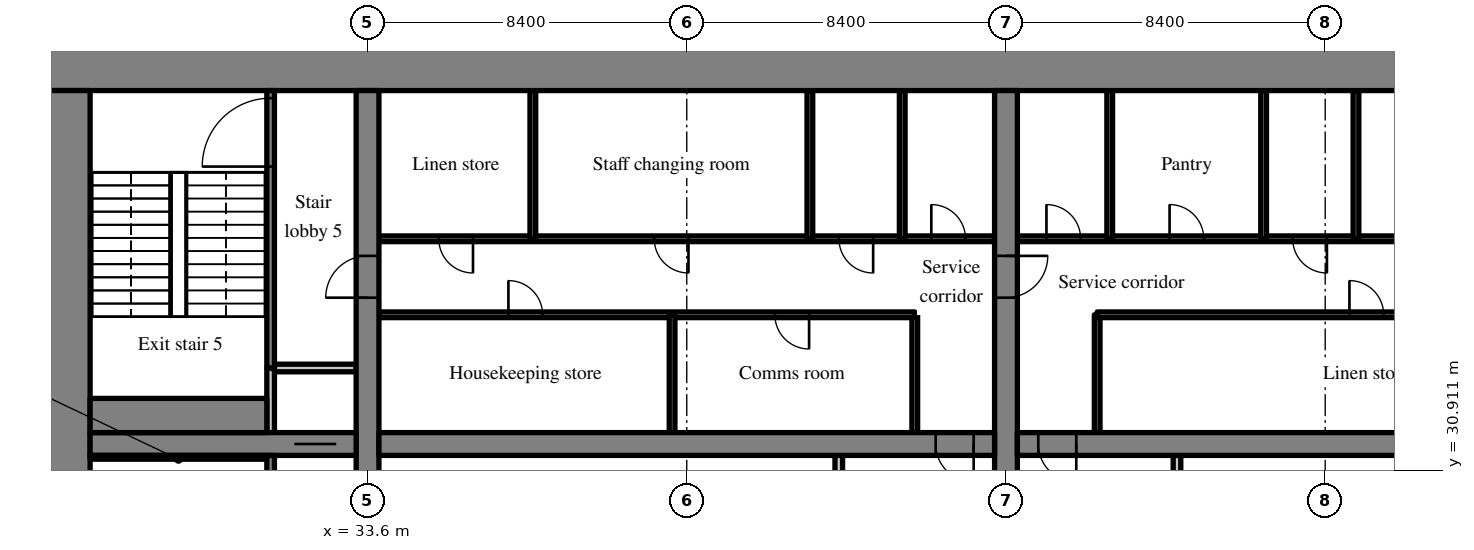
"""IFC4 building model, lengths in metres.
Left out: names, types, materials, properties, quantities, classifications, styles, units other than length and angle.
Written with IfcOpenShell. Run it as: python <this file> out.ifc"""

import sys

from ifc_helpers import new_model, si_unit, direction, frame, frame_2d, origin, place, context, subcontext, project, spatial, rectangle, extrude, source, transform, mapped, element, fill, save


model = new_model("IFC4")
c1 = context("Model", 3, precision=1e-05, world=origin(), true_north=direction((0.0, 1.0)))
c2 = subcontext(c1, "Body", "Model", "MODEL_VIEW")
j1 = project(units=[si_unit("LENGTHUNIT", "METRE"), si_unit("PLANEANGLEUNIT", "RADIAN")], contexts=[c1])
p1 = place(None, origin())
s1 = spatial("IfcSite", under=j1, at=p1, CompositionType="ELEMENT")
p2 = place(p1, origin())
s2 = spatial("IfcBuilding", under=s1, at=p2, CompositionType="ELEMENT")
p3 = place(p2, frame((0.0, 0.0, 23.0)))
s3 = spatial("IfcBuildingStorey", under=s2, at=p3, CompositionType="ELEMENT", Elevation=23.0)
m1 = source(origin(), c2, "Body", "SweptSolid", [
    extrude(rectangle(XDim=50.4, YDim=1.1, at=frame_2d((25.2, 0.0))), origin(), (0.0, 0.0, 1.0), 4.52),
])
p4 = place(p3, frame((25.2, 41.45, 0.0), z_axis=(0.0, 0.0, 1.0), x_axis=(1.0, 0.0, 0.0)))
e1 = element("IfcWall", 1, at=p4, inside=s3, PredefinedType="SHEAR", context=c2, shape_type="MappedRepresentation", body=[
    mapped(m1, transform((0.0, 0.0, 0.0), scale=1.0)),
])
m2 = source(origin(), c2, "Body", "SweptSolid", [
    extrude(rectangle(XDim=17.8, YDim=1.1, at=frame_2d((8.9, 0.0))), origin(), (0.0, 0.0, 1.0), 4.52),
])
p5 = place(p3, frame((25.75, 23.1, 0.0), z_axis=(0.0, 0.0, 1.0), x_axis=(0.0, 1.0, 0.0)))
e2 = element("IfcWall", 2, at=p5, inside=s3, PredefinedType="SHEAR", context=c2, shape_type="MappedRepresentation", body=[
    mapped(m2, transform((0.0, 0.0, 0.0), scale=1.0)),
])
m3 = source(origin(), c2, "Body", "SweptSolid", [
    extrude(rectangle(XDim=17.8, YDim=0.6, at=frame_2d((8.9, 0.0))), origin(), (0.0, 0.0, 1.0), 4.52),
])
p6 = place(p3, frame((33.6, 23.1, 0.0), z_axis=(0.0, 0.0, 1.0), x_axis=(0.0, 1.0, 0.0)))
e3 = element("IfcWall", 3, at=p6, inside=s3, PredefinedType="SHEAR", context=c2, shape_type="MappedRepresentation", body=[
    mapped(m3, transform((0.0, 0.0, 0.0), scale=1.0)),
])
m4 = source(origin(), c2, "Body", "SweptSolid", [
    extrude(rectangle(XDim=1.1, YDim=2.1, at=frame_2d((0.55, 1.05))), frame((0.0, 0.31, 0.0), z_axis=(0.0, -1.0, 0.0), x_axis=(1.0, 0.0, 0.0)), (0.0, 0.0, 1.0), 0.62),
])
p7 = place(p6, frame((12.35, 0.0, 0.0)))
e4 = element("IfcOpeningElement", 4, at=p7, cuts=e3, PredefinedType="OPENING", context=c2, shape_type="MappedRepresentation", body=[
    mapped(m4, transform((0.0, 0.0, 0.0), scale=1.0)),
])
p8 = place(p3, frame((50.4, 23.1, 0.0), z_axis=(0.0, 0.0, 1.0), x_axis=(0.0, 1.0, 0.0)))
e5 = element("IfcWall", 5, at=p8, inside=s3, PredefinedType="SHEAR", context=c2, shape_type="MappedRepresentation", body=[
    mapped(m3, transform((0.0, 0.0, 0.0), scale=1.0)),
])
p9 = place(p8, frame((12.35, 0.0, 0.0)))
e6 = element("IfcOpeningElement", 6, at=p9, cuts=e5, PredefinedType="OPENING", context=c2, shape_type="MappedRepresentation", body=[
    mapped(m4, transform((0.0, 0.0, 0.0), scale=1.0)),
])
m5 = source(origin(), c2, "Body", "SweptSolid", [
    extrude(rectangle(XDim=7.0, YDim=0.6, at=frame_2d((3.5, 0.0))), origin(), (0.0, 0.0, 1.0), 4.52),
])
p10 = place(p3, frame((26.3, 31.6, 0.0), z_axis=(0.0, 0.0, 1.0), x_axis=(1.0, 0.0, 0.0)))
e7 = element("IfcWall", 7, at=p10, inside=s3, PredefinedType="SHEAR", context=c2, shape_type="MappedRepresentation", body=[
    mapped(m5, transform((0.0, 0.0, 0.0), scale=1.0)),
])
p11 = place(p10, frame((5.375, 0.0, 0.0)))
e8 = element("IfcOpeningElement", 8, at=p11, cuts=e7, PredefinedType="OPENING", context=c2, shape_type="MappedRepresentation", body=[
    mapped(m4, transform((0.0, 0.0, 0.0), scale=1.0)),
])
m6 = source(origin(), c2, "Body", "SweptSolid", [
    extrude(rectangle(XDim=16.2, YDim=0.6, at=frame_2d((8.1, 0.0))), origin(), (0.0, 0.0, 1.0), 4.52),
])
p12 = place(p3, frame((33.9, 31.6, 0.0), z_axis=(0.0, 0.0, 1.0), x_axis=(1.0, 0.0, 0.0)))
e9 = element("IfcWall", 9, at=p12, inside=s3, PredefinedType="SHEAR", context=c2, shape_type="MappedRepresentation", body=[
    mapped(m6, transform((0.0, 0.0, 0.0), scale=1.0)),
])
m7 = source(origin(), c2, "Body", "SweptSolid", [
    extrude(rectangle(XDim=1.0, YDim=2.1, at=frame_2d((0.5, 1.05))), frame((0.0, 0.31, 0.0), z_axis=(0.0, -1.0, 0.0), x_axis=(1.0, 0.0, 0.0)), (0.0, 0.0, 1.0), 0.62),
])
p13 = place(p12, frame((14.65, 0.0, 0.0)))
e10 = element("IfcOpeningElement", 10, at=p13, cuts=e9, PredefinedType="OPENING", context=c2, shape_type="MappedRepresentation", body=[
    mapped(m7, transform((0.0, 0.0, 0.0), scale=1.0)),
])
m8 = source(origin(), c2, "Body", "SweptSolid", [
    extrude(rectangle(XDim=16.2, YDim=0.6, at=frame_2d((8.1, 0.0))), origin(), (0.0, 0.0, 1.0), 4.52),
])
p14 = place(p3, frame((50.7, 31.6, 0.0), z_axis=(0.0, 0.0, 1.0), x_axis=(1.0, 0.0, 0.0)))
e11 = element("IfcWall", 11, at=p14, inside=s3, PredefinedType="SHEAR", context=c2, shape_type="MappedRepresentation", body=[
    mapped(m8, transform((0.0, 0.0, 0.0), scale=1.0)),
])
p15 = place(p14, frame((0.55, 0.0, 0.0)))
e12 = element("IfcOpeningElement", 12, at=p15, cuts=e11, PredefinedType="OPENING", context=c2, shape_type="MappedRepresentation", body=[
    mapped(m7, transform((0.0, 0.0, 0.0), scale=1.0)),
])
m9 = source(origin(), c2, "Body", "SweptSolid", [
    extrude(rectangle(XDim=2.5, YDim=0.2, at=frame_2d((1.25, 0.0))), origin(), (0.0, 0.0, 1.0), 4.52),
])
p16 = place(p3, frame((46.0, 28.8, 0.0), z_axis=(0.0, 0.0, 1.0), x_axis=(0.0, 1.0, 0.0)))
e13 = element("IfcWall", 13, at=p16, inside=s3, PredefinedType="SOLIDWALL", context=c2, shape_type="MappedRepresentation", body=[
    mapped(m9, transform((0.0, 0.0, 0.0), scale=1.0)),
])
m10 = source(origin(), c2, "Body", "SweptSolid", [
    extrude(rectangle(XDim=3.1, YDim=0.15, at=frame_2d((1.55, 0.0))), origin(), (0.0, 0.0, 1.0), 4.52),
])
p17 = place(p3, frame((48.0, 31.9, 0.0), z_axis=(0.0, 0.0, 1.0), x_axis=(0.0, 1.0, 0.0)))
e14 = element("IfcWall", 14, at=p17, inside=s3, PredefinedType="PARTITIONING", context=c2, shape_type="MappedRepresentation", body=[
    mapped(m10, transform((0.0, 0.0, 0.0), scale=1.0)),
])
m11 = source(origin(), c2, "Body", "SweptSolid", [
    extrude(rectangle(XDim=14.1, YDim=0.15, at=frame_2d((7.05, 0.0))), origin(), (0.0, 0.0, 1.0), 4.52),
])
p18 = place(p3, frame((33.9, 35.0, 0.0), z_axis=(0.0, 0.0, 1.0), x_axis=(1.0, 0.0, 0.0)))
e15 = element("IfcWall", 15, at=p18, inside=s3, PredefinedType="PARTITIONING", context=c2, shape_type="MappedRepresentation", body=[
    mapped(m11, transform((0.0, 0.0, 0.0), scale=1.0)),
])
m12 = source(origin(), c2, "Body", "SweptSolid", [
    extrude(rectangle(XDim=0.9, YDim=2.1, at=frame_2d((0.45, 1.05))), frame((0.0, 0.085, 0.0), z_axis=(0.0, -1.0, 0.0), x_axis=(1.0, 0.0, 0.0)), (0.0, 0.0, 1.0), 0.17),
])
p19 = place(p18, frame((3.407, 0.0, 0.0)))
e16 = element("IfcOpeningElement", 16, at=p19, cuts=e15, PredefinedType="OPENING", context=c2, shape_type="MappedRepresentation", body=[
    mapped(m12, transform((0.0, 0.0, 0.0), scale=1.0)),
])
p20 = place(p18, frame((10.419, 0.0, 0.0)))
e17 = element("IfcOpeningElement", 17, at=p20, cuts=e15, PredefinedType="OPENING", context=c2, shape_type="MappedRepresentation", body=[
    mapped(m12, transform((0.0, 0.0, 0.0), scale=1.0)),
])
m13 = source(origin(), c2, "Body", "SweptSolid", [
    extrude(rectangle(XDim=16.2, YDim=0.15, at=frame_2d((8.1, 0.0))), origin(), (0.0, 0.0, 1.0), 4.52),
])
p21 = place(p3, frame((33.9, 37.0, 0.0), z_axis=(0.0, 0.0, 1.0), x_axis=(1.0, 0.0, 0.0)))
e18 = element("IfcWall", 18, at=p21, inside=s3, PredefinedType="PARTITIONING", context=c2, shape_type="MappedRepresentation", body=[
    mapped(m13, transform((0.0, 0.0, 0.0), scale=1.0)),
])
p22 = place(p21, frame((1.575, 0.0, 0.0)))
e19 = element("IfcOpeningElement", 19, at=p22, cuts=e18, PredefinedType="OPENING", context=c2, shape_type="MappedRepresentation", body=[
    mapped(m12, transform((0.0, 0.0, 0.0), scale=1.0)),
])
p23 = place(p21, frame((7.245, 0.0, 0.0)))
e20 = element("IfcOpeningElement", 20, at=p23, cuts=e18, PredefinedType="OPENING", context=c2, shape_type="MappedRepresentation", body=[
    mapped(m12, transform((0.0, 0.0, 0.0), scale=1.0)),
])
p24 = place(p21, frame((12.105, 0.0, 0.0)))
e21 = element("IfcOpeningElement", 21, at=p24, cuts=e18, PredefinedType="OPENING", context=c2, shape_type="MappedRepresentation", body=[
    mapped(m12, transform((0.0, 0.0, 0.0), scale=1.0)),
])
p25 = place(p21, frame((14.535, 0.0, 0.0)))
e22 = element("IfcOpeningElement", 22, at=p25, cuts=e18, PredefinedType="OPENING", context=c2, shape_type="MappedRepresentation", body=[
    mapped(m12, transform((0.0, 0.0, 0.0), scale=1.0)),
])
p26 = place(p3, frame((41.614, 31.9, 0.0), z_axis=(0.0, 0.0, 1.0), x_axis=(0.0, 1.0, 0.0)))
e23 = element("IfcWall", 23, at=p26, inside=s3, PredefinedType="PARTITIONING", context=c2, shape_type="MappedRepresentation", body=[
    mapped(m10, transform((0.0, 0.0, 0.0), scale=1.0)),
])
m14 = source(origin(), c2, "Body", "SweptSolid", [
    extrude(rectangle(XDim=3.9, YDim=0.15, at=frame_2d((1.95, 0.0))), origin(), (0.0, 0.0, 1.0), 4.52),
])
for number, where, z_axis, x_axis in (
    (24, (37.95, 37.0, 0.0), (0.0, 0.0, 1.0), (0.0, 1.0, 0.0)),
    (25, (45.24, 37.0, 0.0), (0.0, 0.0, 1.0), (0.0, 1.0, 0.0)),
    (26, (47.67, 37.0, 0.0), (0.0, 0.0, 1.0), (0.0, 1.0, 0.0)),
):
    element("IfcWall", number, at=place(p3, frame(where, z_axis=z_axis, x_axis=x_axis)), inside=s3, PredefinedType="PARTITIONING", context=c2, shape_type="MappedRepresentation", body=[
        mapped(m14, transform((0.0, 0.0, 0.0), scale=1.0)),
    ])
m15 = source(origin(), c2, "Body", "SweptSolid", [
    extrude(rectangle(XDim=8.2, YDim=0.2, at=frame_2d((4.1, 0.0))), origin(), (0.0, 0.0, 1.0), 4.52),
])
p27 = place(p3, frame((54.9, 23.1, 0.0), z_axis=(0.0, 0.0, 1.0), x_axis=(0.0, 1.0, 0.0)))
e27 = element("IfcWall", 27, at=p27, inside=s3, PredefinedType="PARTITIONING", context=c2, shape_type="MappedRepresentation", body=[
    mapped(m15, transform((0.0, 0.0, 0.0), scale=1.0)),
])
p28 = place(p3, frame((52.8, 31.9, 0.0), z_axis=(0.0, 0.0, 1.0), x_axis=(0.0, 1.0, 0.0)))
e28 = element("IfcWall", 28, at=p28, inside=s3, PredefinedType="PARTITIONING", context=c2, shape_type="MappedRepresentation", body=[
    mapped(m10, transform((0.0, 0.0, 0.0), scale=1.0)),
])
m16 = source(origin(), c2, "Body", "SweptSolid", [
    extrude(rectangle(XDim=14.1, YDim=0.15, at=frame_2d((7.05, 0.0))), origin(), (0.0, 0.0, 1.0), 4.52),
])
p29 = place(p3, frame((66.9, 35.0, 0.0), z_axis=(0.0, 0.0, 1.0), x_axis=(-1.0, 0.0, 0.0)))
e29 = element("IfcWall", 29, at=p29, inside=s3, PredefinedType="PARTITIONING", context=c2, shape_type="MappedRepresentation", body=[
    mapped(m16, transform((0.0, 0.0, 0.0), scale=1.0)),
])
p30 = place(p29, frame((6.562, 0.0, 0.0)))
e30 = element("IfcOpeningElement", 30, at=p30, cuts=e29, PredefinedType="OPENING", context=c2, shape_type="MappedRepresentation", body=[
    mapped(m12, transform((0.0, 0.0, 0.0), scale=1.0)),
])
m17 = source(origin(), c2, "Body", "SweptSolid", [
    extrude(rectangle(XDim=16.2, YDim=0.15, at=frame_2d((8.1, 0.0))), origin(), (0.0, 0.0, 1.0), 4.52),
])
p31 = place(p3, frame((66.9, 37.0, 0.0), z_axis=(0.0, 0.0, 1.0), x_axis=(-1.0, 0.0, 0.0)))
e31 = element("IfcWall", 31, at=p31, inside=s3, PredefinedType="PARTITIONING", context=c2, shape_type="MappedRepresentation", body=[
    mapped(m17, transform((0.0, 0.0, 0.0), scale=1.0)),
])
p32 = place(p31, frame((3.195, 0.0, 0.0)))
e32 = element("IfcOpeningElement", 32, at=p32, cuts=e31, PredefinedType="OPENING", context=c2, shape_type="MappedRepresentation", body=[
    mapped(m12, transform((0.0, 0.0, 0.0), scale=1.0)),
])
p33 = place(p31, frame((8.055, 0.0, 0.0)))
e33 = element("IfcOpeningElement", 33, at=p33, cuts=e31, PredefinedType="OPENING", context=c2, shape_type="MappedRepresentation", body=[
    mapped(m12, transform((0.0, 0.0, 0.0), scale=1.0)),
])
p34 = place(p31, frame((11.295, 0.0, 0.0)))
e34 = element("IfcOpeningElement", 34, at=p34, cuts=e31, PredefinedType="OPENING", context=c2, shape_type="MappedRepresentation", body=[
    mapped(m12, transform((0.0, 0.0, 0.0), scale=1.0)),
])
p35 = place(p31, frame((14.535, 0.0, 0.0)))
e35 = element("IfcOpeningElement", 35, at=p35, cuts=e31, PredefinedType="OPENING", context=c2, shape_type="MappedRepresentation", body=[
    mapped(m12, transform((0.0, 0.0, 0.0), scale=1.0)),
])
for number, where, z_axis, x_axis in (
    (36, (59.61, 37.0, 0.0), (0.0, 0.0, 1.0), (0.0, 1.0, 0.0)),
    (37, (57.18, 37.0, 0.0), (0.0, 0.0, 1.0), (0.0, 1.0, 0.0)),
    (38, (53.13, 37.0, 0.0), (0.0, 0.0, 1.0), (0.0, 1.0, 0.0)),
):
    element("IfcWall", number, at=place(p3, frame(where, z_axis=z_axis, x_axis=x_axis)), inside=s3, PredefinedType="PARTITIONING", context=c2, shape_type="MappedRepresentation", body=[
        mapped(m14, transform((0.0, 0.0, 0.0), scale=1.0)),
    ])
m18 = source(origin(), c2, "Body", "SweptSolid", [
    extrude(rectangle(XDim=8.2, YDim=0.2, at=frame_2d((4.1, 0.0))), origin(), (0.0, 0.0, 1.0), 4.52),
])
p36 = place(p3, frame((31.05, 23.1, 0.0), z_axis=(0.0, 0.0, 1.0), x_axis=(0.0, 1.0, 0.0)))
e39 = element("IfcWall", 39, at=p36, inside=s3, PredefinedType="SOLIDWALL", context=c2, shape_type="MappedRepresentation", body=[
    mapped(m18, transform((0.0, 0.0, 0.0), scale=1.0)),
])
m19 = source(origin(), c2, "Body", "SweptSolid", [
    extrude(rectangle(XDim=1.2, YDim=2.1, at=frame_2d((0.6, 1.05))), frame((0.0, 0.11, 0.0), z_axis=(0.0, -1.0, 0.0), x_axis=(1.0, 0.0, 0.0)), (0.0, 0.0, 1.0), 0.22),
])
p37 = place(p36, frame((6.4, 0.0, 0.0)))
e40 = element("IfcOpeningElement", 40, at=p37, cuts=e39, PredefinedType="OPENING", context=c2, shape_type="MappedRepresentation", body=[
    mapped(m19, transform((0.0, 0.0, 0.0), scale=1.0)),
])
m20 = source(origin(), c2, "Body", "SweptSolid", [
    extrude(rectangle(XDim=1.7, YDim=0.2, at=frame_2d((0.85, 0.0))), origin(), (0.0, 0.0, 1.0), 4.52),
])
p38 = place(p3, frame((31.05, 31.9, 0.0), z_axis=(0.0, 0.0, 1.0), x_axis=(0.0, 1.0, 0.0)))
e41 = element("IfcWall", 41, at=p38, inside=s3, PredefinedType="SOLIDWALL", context=c2, shape_type="MappedRepresentation", body=[
    mapped(m20, transform((0.0, 0.0, 0.0), scale=1.0)),
])
m21 = source(origin(), c2, "Body", "SweptSolid", [
    extrude(rectangle(XDim=2.15, YDim=0.2, at=frame_2d((1.075, 0.0))), origin(), (0.0, 0.0, 1.0), 4.52),
])
p39 = place(p3, frame((31.15, 33.6, 0.0), z_axis=(0.0, 0.0, 1.0), x_axis=(1.0, 0.0, 0.0)))
e42 = element("IfcWall", 42, at=p39, inside=s3, PredefinedType="SOLIDWALL", context=c2, shape_type="MappedRepresentation", body=[
    mapped(m21, transform((0.0, 0.0, 0.0), scale=1.0)),
])
m22 = source(origin(), c2, "Body", "SweptSolid", [
    extrude(rectangle(XDim=7.3, YDim=0.2, at=frame_2d((3.65, 0.0))), origin(), (0.0, 0.0, 1.0), 4.52),
])
p40 = place(p3, frame((31.05, 33.6, 0.0), z_axis=(0.0, 0.0, 1.0), x_axis=(0.0, 1.0, 0.0)))
e43 = element("IfcWall", 43, at=p40, inside=s3, PredefinedType="SOLIDWALL", context=c2, shape_type="MappedRepresentation", body=[
    mapped(m22, transform((0.0, 0.0, 0.0), scale=1.0)),
])
m23 = source(origin(), c2, "Body", "SweptSolid", [
    extrude(rectangle(XDim=1.8, YDim=2.1, at=frame_2d((0.9, 1.05))), frame((0.0, 0.11, 0.0), z_axis=(0.0, -1.0, 0.0), x_axis=(1.0, 0.0, 0.0)), (0.0, 0.0, 1.0), 0.22),
])
p41 = place(p40, frame((5.3, 0.0, 0.0)))
e44 = element("IfcOpeningElement", 44, at=p41, cuts=e43, PredefinedType="OPENING", context=c2, shape_type="MappedRepresentation", body=[
    mapped(m23, transform((0.0, 0.0, 0.0), scale=1.0)),
])
m24 = source(origin(), c2, "Body", "SweptSolid", [
    extrude(rectangle(XDim=4.65, YDim=0.1, at=frame_2d((2.325, 0.0))), origin(), (0.0, 0.0, 1.0), 4.52),
])
p42 = place(p3, frame((26.3, 31.25, 0.0), z_axis=(0.0, 0.0, 1.0), x_axis=(1.0, 0.0, 0.0)))
e45 = element("IfcWall", 45, at=p42, inside=s3, PredefinedType="SOLIDWALL", context=c2, shape_type="MappedRepresentation", body=[
    mapped(m24, transform((0.0, 0.0, 0.0), scale=1.0)),
])
m25 = source(origin(), c2, "Body", "SweptSolid", [
    extrude(rectangle(XDim=4.65, YDim=0.9, at=frame_2d((2.325, 0.0))), origin(), (0.0, 0.0, 1.0), 4.52),
])
p43 = place(p3, frame((26.3, 32.35, 0.0), z_axis=(0.0, 0.0, 1.0), x_axis=(1.0, 0.0, 0.0)))
e46 = element("IfcWall", 46, at=p43, inside=s3, PredefinedType="SOLIDWALL", context=c2, shape_type="MappedRepresentation", body=[
    mapped(m25, transform((0.0, 0.0, 0.0), scale=1.0)),
])
m26 = source(origin(), c2, "Body", "SweptSolid", [
    extrude(rectangle(XDim=1.0, YDim=2.1, at=frame_2d((0.5, 1.05))), frame((0.0, 0.025, 0.0), z_axis=(0.0, -1.0, 0.0), x_axis=(1.0, 0.0, 0.0)), (0.0, 0.0, 1.0), 0.05),
])
p44 = place(p13, origin())
e47 = element("IfcDoor", 47, at=p44, inside=s3, OperationType="SINGLE_SWING_RIGHT", PredefinedType="DOOR", context=c2, shape_type="MappedRepresentation", body=[
    mapped(m26, transform((0.0, 0.0, 0.0), scale=1.0)),
])
fill(e10, e47)
m27 = source(origin(), c2, "Body", "SweptSolid", [
    extrude(rectangle(XDim=0.9, YDim=2.1, at=frame_2d((0.45, 1.05))), frame((0.0, 0.025, 0.0), z_axis=(0.0, -1.0, 0.0), x_axis=(1.0, 0.0, 0.0)), (0.0, 0.0, 1.0), 0.05),
])
p45 = place(p19, origin())
e48 = element("IfcDoor", 48, at=p45, inside=s3, OperationType="SINGLE_SWING_LEFT", PredefinedType="DOOR", context=c2, shape_type="MappedRepresentation", body=[
    mapped(m27, transform((0.0, 0.0, 0.0), scale=1.0)),
])
fill(e16, e48)
p46 = place(p20, origin())
e49 = element("IfcDoor", 49, at=p46, inside=s3, OperationType="SINGLE_SWING_RIGHT", PredefinedType="DOOR", context=c2, shape_type="MappedRepresentation", body=[
    mapped(m27, transform((0.0, 0.0, 0.0), scale=1.0)),
])
fill(e17, e49)
p47 = place(p22, origin())
e50 = element("IfcDoor", 50, at=p47, inside=s3, OperationType="SINGLE_SWING_RIGHT", PredefinedType="DOOR", context=c2, shape_type="MappedRepresentation", body=[
    mapped(m27, transform((0.0, 0.0, 0.0), scale=1.0)),
])
fill(e19, e50)
p48 = place(p23, origin())
e51 = element("IfcDoor", 51, at=p48, inside=s3, OperationType="SINGLE_SWING_RIGHT", PredefinedType="DOOR", context=c2, shape_type="MappedRepresentation", body=[
    mapped(m27, transform((0.0, 0.0, 0.0), scale=1.0)),
])
fill(e20, e51)
p49 = place(p24, origin())
e52 = element("IfcDoor", 52, at=p49, inside=s3, OperationType="SINGLE_SWING_RIGHT", PredefinedType="DOOR", context=c2, shape_type="MappedRepresentation", body=[
    mapped(m27, transform((0.0, 0.0, 0.0), scale=1.0)),
])
fill(e21, e52)
p50 = place(p25, origin())
e53 = element("IfcDoor", 53, at=p50, inside=s3, OperationType="SINGLE_SWING_LEFT", PredefinedType="DOOR", context=c2, shape_type="MappedRepresentation", body=[
    mapped(m27, transform((0.0, 0.0, 0.0), scale=1.0)),
])
fill(e22, e53)
p51 = place(p15, origin())
e54 = element("IfcDoor", 54, at=p51, inside=s3, OperationType="SINGLE_SWING_RIGHT", PredefinedType="DOOR", context=c2, shape_type="MappedRepresentation", body=[
    mapped(m26, transform((0.0, 0.0, 0.0), scale=1.0)),
])
fill(e12, e54)
p52 = place(p30, origin())
e55 = element("IfcDoor", 55, at=p52, inside=s3, OperationType="SINGLE_SWING_RIGHT", PredefinedType="DOOR", context=c2, shape_type="MappedRepresentation", body=[
    mapped(m27, transform((0.0, 0.0, 0.0), scale=1.0)),
])
fill(e30, e55)
p53 = place(p33, origin())
e56 = element("IfcDoor", 56, at=p53, inside=s3, OperationType="SINGLE_SWING_LEFT", PredefinedType="DOOR", context=c2, shape_type="MappedRepresentation", body=[
    mapped(m27, transform((0.0, 0.0, 0.0), scale=1.0)),
])
fill(e33, e56)
p54 = place(p34, origin())
e57 = element("IfcDoor", 57, at=p54, inside=s3, OperationType="SINGLE_SWING_RIGHT", PredefinedType="DOOR", context=c2, shape_type="MappedRepresentation", body=[
    mapped(m27, transform((0.0, 0.0, 0.0), scale=1.0)),
])
fill(e34, e57)
p55 = place(p35, origin())
e58 = element("IfcDoor", 58, at=p55, inside=s3, OperationType="SINGLE_SWING_RIGHT", PredefinedType="DOOR", context=c2, shape_type="MappedRepresentation", body=[
    mapped(m27, transform((0.0, 0.0, 0.0), scale=1.0)),
])
fill(e35, e58)
m28 = source(origin(), c2, "Body", "SweptSolid", [
    extrude(rectangle(XDim=1.1, YDim=2.1, at=frame_2d((0.55, 1.05))), frame((0.0, 0.025, 0.0), z_axis=(0.0, -1.0, 0.0), x_axis=(1.0, 0.0, 0.0)), (0.0, 0.0, 1.0), 0.05),
])
p56 = place(p11, origin())
e59 = element("IfcDoor", 59, at=p56, inside=s3, OperationType="SLIDING_TO_RIGHT", PredefinedType="DOOR", context=c2, shape_type="MappedRepresentation", body=[
    mapped(m28, transform((0.0, 0.0, 0.0), scale=1.0)),
])
fill(e8, e59)
m29 = source(origin(), c2, "Body", "SweptSolid", [
    extrude(rectangle(XDim=1.8, YDim=2.1, at=frame_2d((0.9, 1.05))), frame((0.0, 0.025, 0.0), z_axis=(0.0, -1.0, 0.0), x_axis=(1.0, 0.0, 0.0)), (0.0, 0.0, 1.0), 0.05),
])
p57 = place(p41, origin())
e60 = element("IfcDoor", 60, at=p57, inside=s3, OperationType="SINGLE_SWING_LEFT", PredefinedType="DOOR", context=c2, shape_type="MappedRepresentation", body=[
    mapped(m29, transform((0.0, 0.0, 0.0), scale=1.0)),
])
fill(e44, e60)
p58 = place(p7, origin())
e61 = element("IfcDoor", 61, at=p58, inside=s3, OperationType="SINGLE_SWING_LEFT", PredefinedType="DOOR", context=c2, shape_type="MappedRepresentation", body=[
    mapped(m28, transform((0.0, 0.0, 0.0), scale=1.0)),
])
fill(e4, e61)
p59 = place(p9, origin())
e62 = element("IfcDoor", 62, at=p59, inside=s3, OperationType="SINGLE_SWING_RIGHT", PredefinedType="DOOR", context=c2, shape_type="MappedRepresentation", body=[
    mapped(m28, transform((0.0, 0.0, 0.0), scale=1.0)),
])
fill(e6, e62)
save(model, sys.argv[1])
